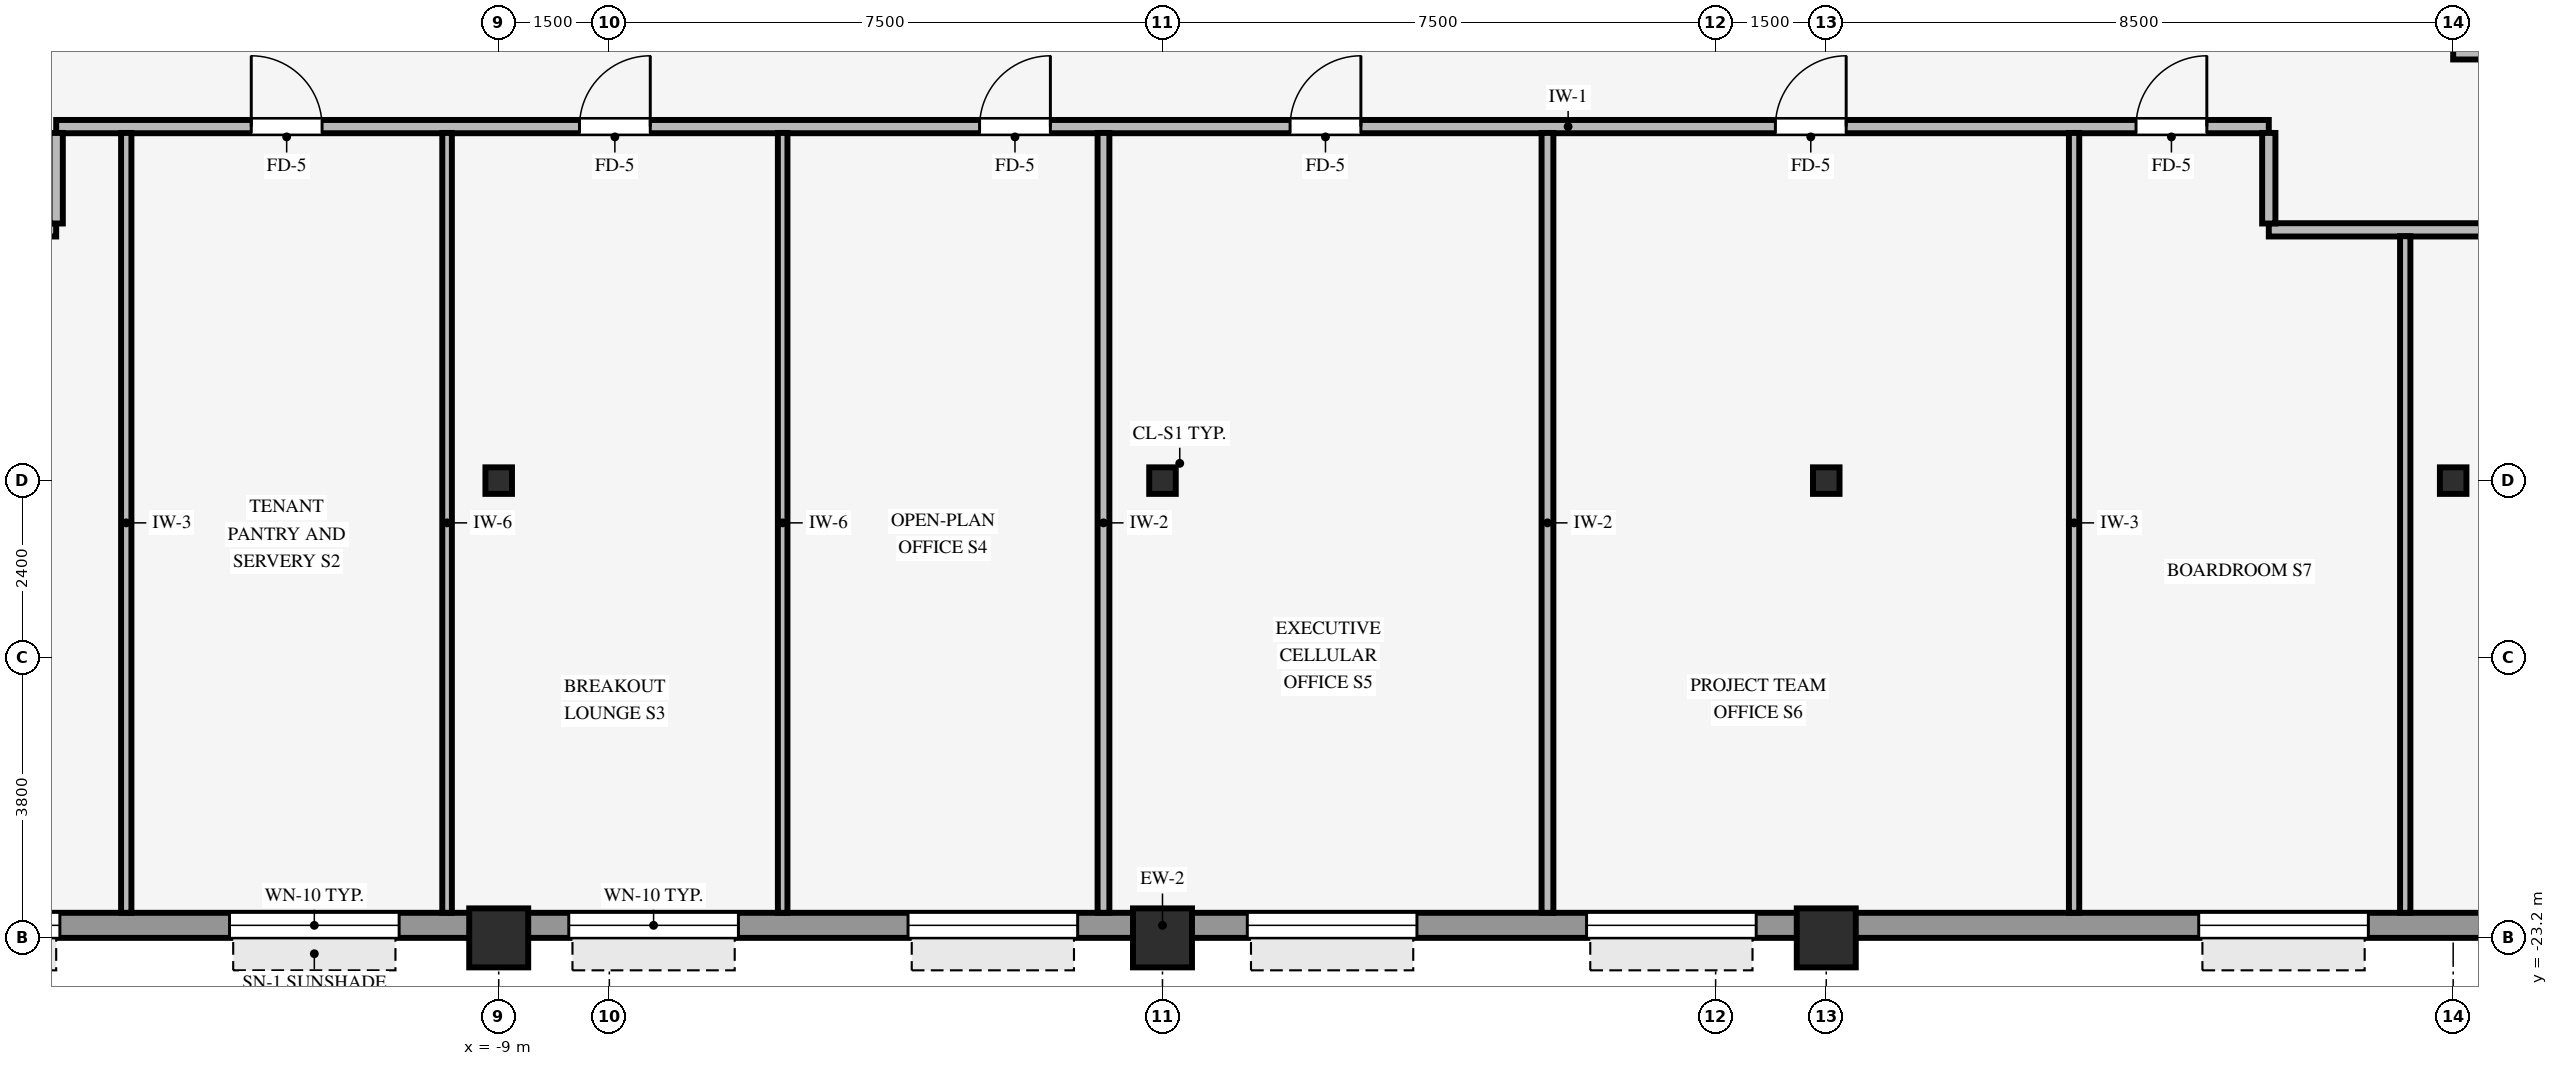
"""IFC4 building model, lengths in metres.
Left out: names, types, materials, properties, quantities, classifications, styles, units other than length and angle.
Written with IfcOpenShell. Run it as: python <this file> out.ifc"""

import sys

from ifc_helpers import new_model, si_unit, direction, frame, frame_2d, origin, origin_2d, place, context, subcontext, project, spatial, rectangle, hollow_rectangle, i_section, extrude, source, transform, mapped, element, fill, save


model = new_model("IFC4")
c1 = context("Model", 3, precision=1e-05, world=origin(), true_north=direction((0.0, 1.0)))
c2 = subcontext(c1, "Body", "Model", "MODEL_VIEW")
j1 = project(units=[si_unit("LENGTHUNIT", "METRE"), si_unit("PLANEANGLEUNIT", "RADIAN")], contexts=[c1])
p1 = place(None, origin())
s1 = spatial("IfcSite", under=j1, at=p1, CompositionType="ELEMENT")
p2 = place(p1, origin())
s2 = spatial("IfcBuilding", under=s1, at=p2, CompositionType="ELEMENT")
p3 = place(p2, frame((0.0, 0.0, 71.4)))
s3 = spatial("IfcBuildingStorey", under=s2, at=p3, CompositionType="ELEMENT", Elevation=71.4)
for number, where, z_axis, x_axis in (
    (1, (-9.0, -23.2, 0.0), (0.0, 0.0, 1.0), (1.0, 0.0, 0.0)),
    (2, (0.0, -23.2, 0.0), (0.0, 0.0, 1.0), (1.0, 0.0, 0.0)),
    (3, (9.0, -23.2, 0.0), (0.0, 0.0, 1.0), (1.0, 0.0, 0.0)),
):
    element("IfcColumn", number, at=place(p3, frame(where, z_axis=z_axis, x_axis=x_axis)), inside=s3, PredefinedType="COLUMN", context=c2, shape_type="SweptSolid", body=[
        extrude(hollow_rectangle(XDim=0.8, YDim=0.8, WallThickness=0.055, InnerFilletRadius=0.055, OuterFilletRadius=0.11, at=origin_2d()), origin(), (0.0, 0.0, 1.0), 3.37),
    ])
for number, where, z_axis, x_axis in (
    (4, (0.0, -17.0, 0.0), (0.0, 0.0, 1.0), (1.0, 0.0, 0.0)),
    (5, (-9.0, -17.0, 0.0), (0.0, 0.0, 1.0), (1.0, 0.0, 0.0)),
    (6, (9.0, -17.0, 0.0), (0.0, 0.0, 1.0), (1.0, 0.0, 0.0)),
    (7, (17.5, -17.0, 0.0), (0.0, 0.0, 1.0), (1.0, 0.0, 0.0)),
):
    element("IfcColumn", number, at=place(p3, frame(where, z_axis=z_axis, x_axis=x_axis)), inside=s3, PredefinedType="COLUMN", context=c2, shape_type="SweptSolid", body=[
        extrude(i_section(OverallWidth=0.36, OverallDepth=0.36, WebThickness=0.021, FlangeThickness=0.021, FilletRadius=0.018, at=origin_2d()), origin(), (0.0, 0.0, 1.0), 3.37),
    ])
p4 = place(p3, frame((-19.4, -23.03, 0.0), z_axis=(0.0, 0.0, 1.0), x_axis=(1.0, 0.0, 0.0)))
e8 = element("IfcWall", 8, at=p4, inside=s3, PredefinedType="STANDARD", context=c2, shape_type="SweptSolid", body=[
    extrude(rectangle(XDim=38.8, YDim=0.34, at=frame_2d((19.4, 0.0))), origin(), (0.0, 0.0, 1.0), 2.705),
])
p5 = place(p4, frame((2.15, 0.0, 0.8)))
e9 = element("IfcOpeningElement", 9, at=p5, cuts=e8, PredefinedType="OPENING", context=c2, shape_type="SweptSolid", body=[
    extrude(rectangle(XDim=2.3, YDim=1.62, at=frame_2d((1.15, 0.81))), frame((0.0, 0.18, 0.0), z_axis=(0.0, -1.0, 0.0), x_axis=(1.0, 0.0, 0.0)), (0.0, 0.0, 1.0), 0.36),
])
p6 = place(p4, frame((6.75, 0.0, 0.8)))
e10 = element("IfcOpeningElement", 10, at=p6, cuts=e8, PredefinedType="OPENING", context=c2, shape_type="SweptSolid", body=[
    extrude(rectangle(XDim=2.3, YDim=1.62, at=frame_2d((1.15, 0.81))), frame((0.0, 0.18, 0.0), z_axis=(0.0, -1.0, 0.0), x_axis=(1.0, 0.0, 0.0)), (0.0, 0.0, 1.0), 0.36),
])
p7 = place(p4, frame((11.35, 0.0, 0.8)))
e11 = element("IfcOpeningElement", 11, at=p7, cuts=e8, PredefinedType="OPENING", context=c2, shape_type="SweptSolid", body=[
    extrude(rectangle(XDim=2.3, YDim=1.62, at=frame_2d((1.15, 0.81))), frame((0.0, 0.18, 0.0), z_axis=(0.0, -1.0, 0.0), x_axis=(1.0, 0.0, 0.0)), (0.0, 0.0, 1.0), 0.36),
])
p8 = place(p4, frame((15.95, 0.0, 0.8)))
e12 = element("IfcOpeningElement", 12, at=p8, cuts=e8, PredefinedType="OPENING", context=c2, shape_type="SweptSolid", body=[
    extrude(rectangle(XDim=2.3, YDim=1.62, at=frame_2d((1.15, 0.81))), frame((0.0, 0.18, 0.0), z_axis=(0.0, -1.0, 0.0), x_axis=(1.0, 0.0, 0.0)), (0.0, 0.0, 1.0), 0.36),
])
p9 = place(p4, frame((20.55, 0.0, 0.8)))
e13 = element("IfcOpeningElement", 13, at=p9, cuts=e8, PredefinedType="OPENING", context=c2, shape_type="SweptSolid", body=[
    extrude(rectangle(XDim=2.3, YDim=1.62, at=frame_2d((1.15, 0.81))), frame((0.0, 0.18, 0.0), z_axis=(0.0, -1.0, 0.0), x_axis=(1.0, 0.0, 0.0)), (0.0, 0.0, 1.0), 0.36),
])
p10 = place(p4, frame((25.15, 0.0, 0.8)))
e14 = element("IfcOpeningElement", 14, at=p10, cuts=e8, PredefinedType="OPENING", context=c2, shape_type="SweptSolid", body=[
    extrude(rectangle(XDim=2.3, YDim=1.62, at=frame_2d((1.15, 0.81))), frame((0.0, 0.18, 0.0), z_axis=(0.0, -1.0, 0.0), x_axis=(1.0, 0.0, 0.0)), (0.0, 0.0, 1.0), 0.36),
])
p11 = place(p4, frame((33.45, 0.0, 0.8)))
e15 = element("IfcOpeningElement", 15, at=p11, cuts=e8, PredefinedType="OPENING", context=c2, shape_type="SweptSolid", body=[
    extrude(rectangle(XDim=2.3, YDim=1.62, at=frame_2d((1.15, 0.81))), frame((0.0, 0.18, 0.0), z_axis=(0.0, -1.0, 0.0), x_axis=(1.0, 0.0, 0.0)), (0.0, 0.0, 1.0), 0.36),
])
p12 = place(p3, frame((-20.5, -13.6, 0.0), z_axis=(0.0, 0.0, 1.0), x_axis=(1.0, 0.0, 0.0)))
e16 = element("IfcWall", 16, at=p12, inside=s3, PredefinedType="PARTITIONING", context=c2, shape_type="SweptSolid", body=[
    extrude(rectangle(XDim=5.5, YDim=0.18, at=frame_2d((2.75, 0.0))), origin(), (0.0, 0.0, 1.0), 2.942),
])
p13 = place(p12, frame((2.27, 0.0, 0.0)))
e17 = element("IfcOpeningElement", 17, at=p13, cuts=e16, PredefinedType="OPENING", context=c2, shape_type="SweptSolid", body=[
    extrude(rectangle(XDim=0.96, YDim=2.1, at=frame_2d((0.48, 1.05))), frame((0.0, 0.1, 0.0), z_axis=(0.0, -1.0, 0.0), x_axis=(1.0, 0.0, 0.0)), (0.0, 0.0, 1.0), 0.2),
])
p14 = place(p3, frame((15.0, -13.6, 0.0), z_axis=(0.0, 0.0, 1.0), x_axis=(1.0, 0.0, 0.0)))
e18 = element("IfcWall", 18, at=p14, inside=s3, PredefinedType="PARTITIONING", context=c2, shape_type="SweptSolid", body=[
    extrude(rectangle(XDim=5.5, YDim=0.18, at=frame_2d((2.75, 0.0))), origin(), (0.0, 0.0, 1.0), 2.942),
])
p15 = place(p14, frame((3.195, 0.0, 0.0)))
e19 = element("IfcOpeningElement", 19, at=p15, cuts=e18, PredefinedType="OPENING", context=c2, shape_type="SweptSolid", body=[
    extrude(rectangle(XDim=0.96, YDim=2.1, at=frame_2d((0.48, 1.05))), frame((0.0, 0.1, 0.0), z_axis=(0.0, -1.0, 0.0), x_axis=(1.0, 0.0, 0.0)), (0.0, 0.0, 1.0), 0.2),
])
p16 = place(p3, frame((-15.0, -12.2, 0.0), z_axis=(0.0, 0.0, 1.0), x_axis=(1.0, 0.0, 0.0)))
e20 = element("IfcWall", 20, at=p16, inside=s3, PredefinedType="PARTITIONING", context=c2, shape_type="SweptSolid", body=[
    extrude(rectangle(XDim=30.0, YDim=0.18, at=frame_2d((15.0, 0.0))), origin(), (0.0, 0.0, 1.0), 3.36),
])
p17 = place(p16, frame((23.31, 0.0, 0.0)))
e21 = element("IfcOpeningElement", 21, at=p17, cuts=e20, PredefinedType="OPENING", context=c2, shape_type="SweptSolid", body=[
    extrude(rectangle(XDim=0.96, YDim=2.1, at=frame_2d((0.48, 1.05))), frame((0.0, 0.1, 0.0), z_axis=(0.0, -1.0, 0.0), x_axis=(1.0, 0.0, 0.0)), (0.0, 0.0, 1.0), 0.2),
])
p18 = place(p16, frame((16.73, 0.0, 0.0)))
e22 = element("IfcOpeningElement", 22, at=p18, cuts=e20, PredefinedType="OPENING", context=c2, shape_type="SweptSolid", body=[
    extrude(rectangle(XDim=0.96, YDim=2.1, at=frame_2d((0.48, 1.05))), frame((0.0, 0.1, 0.0), z_axis=(0.0, -1.0, 0.0), x_axis=(1.0, 0.0, 0.0)), (0.0, 0.0, 1.0), 0.2),
])
p19 = place(p16, frame((7.095, 0.0, 0.0)))
e23 = element("IfcOpeningElement", 23, at=p19, cuts=e20, PredefinedType="OPENING", context=c2, shape_type="SweptSolid", body=[
    extrude(rectangle(XDim=0.96, YDim=2.1, at=frame_2d((0.48, 1.05))), frame((0.0, 0.1, 0.0), z_axis=(0.0, -1.0, 0.0), x_axis=(1.0, 0.0, 0.0)), (0.0, 0.0, 1.0), 0.2),
])
p20 = place(p16, frame((2.645, 0.0, 0.0)))
e24 = element("IfcOpeningElement", 24, at=p20, cuts=e20, PredefinedType="OPENING", context=c2, shape_type="SweptSolid", body=[
    extrude(rectangle(XDim=0.96, YDim=2.1, at=frame_2d((0.48, 1.05))), frame((0.0, 0.1, 0.0), z_axis=(0.0, -1.0, 0.0), x_axis=(1.0, 0.0, 0.0)), (0.0, 0.0, 1.0), 0.2),
])
p21 = place(p16, frame((28.2, 0.0, 0.0)))
e25 = element("IfcOpeningElement", 25, at=p21, cuts=e20, PredefinedType="OPENING", context=c2, shape_type="SweptSolid", body=[
    extrude(rectangle(XDim=0.96, YDim=2.1, at=frame_2d((0.48, 1.05))), frame((0.0, 0.1, 0.0), z_axis=(0.0, -1.0, 0.0), x_axis=(1.0, 0.0, 0.0)), (0.0, 0.0, 1.0), 0.2),
])
p22 = place(p16, frame((12.52, 0.0, 0.0)))
e26 = element("IfcOpeningElement", 26, at=p22, cuts=e20, PredefinedType="OPENING", context=c2, shape_type="SweptSolid", body=[
    extrude(rectangle(XDim=0.96, YDim=2.1, at=frame_2d((0.48, 1.05))), frame((0.0, 0.1, 0.0), z_axis=(0.0, -1.0, 0.0), x_axis=(1.0, 0.0, 0.0)), (0.0, 0.0, 1.0), 0.2),
])
p23 = place(p3, frame((17.5, -11.2, 0.0), z_axis=(0.0, 0.0, 1.0), x_axis=(1.0, 0.0, 0.0)))
e27 = element("IfcWall", 27, at=p23, inside=s3, PredefinedType="PARTITIONING", context=c2, shape_type="SweptSolid", body=[
    extrude(rectangle(XDim=3.66, YDim=0.18, at=frame_2d((1.83, 0.0))), origin(), (0.0, 0.0, 1.0), 3.36),
])
p24 = place(p3, frame((-15.0, -13.514, 0.0), z_axis=(0.0, 0.0, 1.0), x_axis=(0.0, 1.0, 0.0)))
e28 = element("IfcWall", 28, at=p24, inside=s3, PredefinedType="PARTITIONING", context=c2, shape_type="SweptSolid", body=[
    extrude(rectangle(XDim=1.228, YDim=0.18, at=frame_2d((0.614, 0.0))), origin(), (0.0, 0.0, 1.0), 3.36),
])
p25 = place(p3, frame((-14.05, -22.86, 0.0), z_axis=(0.0, 0.0, 1.0), x_axis=(0.0, 1.0, 0.0)))
e29 = element("IfcWall", 29, at=p25, inside=s3, PredefinedType="PARTITIONING", context=c2, shape_type="SweptSolid", body=[
    extrude(rectangle(XDim=10.574, YDim=0.14, at=frame_2d((5.287, 0.0))), origin(), (0.0, 0.0, 1.0), 3.36),
])
for number, where, z_axis, x_axis in (
    (30, (-9.7, -22.86, 0.0), (0.0, 0.0, 1.0), (0.0, 1.0, 0.0)),
    (31, (-5.15, -22.86, 0.0), (0.0, 0.0, 1.0), (0.0, 1.0, 0.0)),
):
    element("IfcWall", number, at=place(p3, frame(where, z_axis=z_axis, x_axis=x_axis)), inside=s3, PredefinedType="PARTITIONING", context=c2, shape_type="SweptSolid", body=[
        extrude(rectangle(XDim=10.574, YDim=0.13, at=frame_2d((5.287, 0.0))), origin(), (0.0, 0.0, 1.0), 3.36),
    ])
for number, where, z_axis, x_axis in (
    (32, (-0.8, -22.86, 0.0), (0.0, 0.0, 1.0), (0.0, 1.0, 0.0)),
    (33, (5.22, -22.86, 0.0), (0.0, 0.0, 1.0), (0.0, 1.0, 0.0)),
):
    element("IfcWall", number, at=place(p3, frame(where, z_axis=z_axis, x_axis=x_axis)), inside=s3, PredefinedType="PARTITIONING", context=c2, shape_type="SweptSolid", body=[
        extrude(rectangle(XDim=10.574, YDim=0.16, at=frame_2d((5.287, 0.0))), origin(), (0.0, 0.0, 1.0), 3.36),
    ])
p26 = place(p3, frame((12.36, -22.86, 0.0), z_axis=(0.0, 0.0, 1.0), x_axis=(0.0, 1.0, 0.0)))
e34 = element("IfcWall", 34, at=p26, inside=s3, PredefinedType="PARTITIONING", context=c2, shape_type="SweptSolid", body=[
    extrude(rectangle(XDim=10.574, YDim=0.14, at=frame_2d((5.287, 0.0))), origin(), (0.0, 0.0, 1.0), 3.36),
])
p27 = place(p3, frame((15.0, -13.514, 0.0), z_axis=(0.0, 0.0, 1.0), x_axis=(0.0, 1.0, 0.0)))
e35 = element("IfcWall", 35, at=p27, inside=s3, PredefinedType="PARTITIONING", context=c2, shape_type="SweptSolid", body=[
    extrude(rectangle(XDim=1.228, YDim=0.18, at=frame_2d((0.614, 0.0))), origin(), (0.0, 0.0, 1.0), 3.36),
])
p28 = place(p3, frame((16.85, -22.86, 0.0), z_axis=(0.0, 0.0, 1.0), x_axis=(0.0, 1.0, 0.0)))
e36 = element("IfcWall", 36, at=p28, inside=s3, PredefinedType="PARTITIONING", context=c2, shape_type="SweptSolid", body=[
    extrude(rectangle(XDim=9.174, YDim=0.14, at=frame_2d((4.587, 0.0))), origin(), (0.0, 0.0, 1.0), 3.36),
])
m1 = source(origin(), c2, "Body", "SweptSolid", [
    extrude(rectangle(XDim=2.3, YDim=1.62, at=frame_2d((1.15, 0.81))), frame((0.0, 0.03, 0.0), z_axis=(0.0, -1.0, 0.0), x_axis=(1.0, 0.0, 0.0)), (0.0, 0.0, 1.0), 0.06),
])
p29 = place(p5, origin())
e37 = element("IfcWindow", 37, at=p29, inside=s3, PartitioningType="SINGLE_PANEL", PredefinedType="WINDOW", context=c2, shape_type="MappedRepresentation", body=[
    mapped(m1, transform((0.0, 0.0, 0.0), scale=1.0)),
])
fill(e9, e37)
p30 = place(p6, origin())
e38 = element("IfcWindow", 38, at=p30, inside=s3, PartitioningType="SINGLE_PANEL", PredefinedType="WINDOW", context=c2, shape_type="MappedRepresentation", body=[
    mapped(m1, transform((0.0, 0.0, 0.0), scale=1.0)),
])
fill(e10, e38)
p31 = place(p7, origin())
e39 = element("IfcWindow", 39, at=p31, inside=s3, PartitioningType="SINGLE_PANEL", PredefinedType="WINDOW", context=c2, shape_type="MappedRepresentation", body=[
    mapped(m1, transform((0.0, 0.0, 0.0), scale=1.0)),
])
fill(e11, e39)
p32 = place(p8, origin())
e40 = element("IfcWindow", 40, at=p32, inside=s3, PartitioningType="SINGLE_PANEL", PredefinedType="WINDOW", context=c2, shape_type="MappedRepresentation", body=[
    mapped(m1, transform((0.0, 0.0, 0.0), scale=1.0)),
])
fill(e12, e40)
p33 = place(p9, origin())
e41 = element("IfcWindow", 41, at=p33, inside=s3, PartitioningType="SINGLE_PANEL", PredefinedType="WINDOW", context=c2, shape_type="MappedRepresentation", body=[
    mapped(m1, transform((0.0, 0.0, 0.0), scale=1.0)),
])
fill(e13, e41)
p34 = place(p10, origin())
e42 = element("IfcWindow", 42, at=p34, inside=s3, PartitioningType="SINGLE_PANEL", PredefinedType="WINDOW", context=c2, shape_type="MappedRepresentation", body=[
    mapped(m1, transform((0.0, 0.0, 0.0), scale=1.0)),
])
fill(e14, e42)
p35 = place(p11, origin())
e43 = element("IfcWindow", 43, at=p35, inside=s3, PartitioningType="SINGLE_PANEL", PredefinedType="WINDOW", context=c2, shape_type="MappedRepresentation", body=[
    mapped(m1, transform((0.0, 0.0, 0.0), scale=1.0)),
])
fill(e15, e43)
m2 = source(origin(), c2, "Body", "SweptSolid", [
    extrude(rectangle(XDim=0.96, YDim=2.1, at=frame_2d((0.48, 1.05))), frame((0.0, 0.025, 0.0), z_axis=(0.0, -1.0, 0.0), x_axis=(1.0, 0.0, 0.0)), (0.0, 0.0, 1.0), 0.05),
])
p36 = place(p17, origin())
e44 = element("IfcDoor", 44, at=p36, inside=s3, OperationType="SINGLE_SWING_RIGHT", PredefinedType="DOOR", context=c2, shape_type="MappedRepresentation", body=[
    mapped(m2, transform((0.0, 0.0, 0.0), scale=1.0)),
])
fill(e21, e44)
p37 = place(p18, origin())
e45 = element("IfcDoor", 45, at=p37, inside=s3, OperationType="SINGLE_SWING_RIGHT", PredefinedType="DOOR", context=c2, shape_type="MappedRepresentation", body=[
    mapped(m2, transform((0.0, 0.0, 0.0), scale=1.0)),
])
fill(e22, e45)
p38 = place(p19, origin())
e46 = element("IfcDoor", 46, at=p38, inside=s3, OperationType="SINGLE_SWING_RIGHT", PredefinedType="DOOR", context=c2, shape_type="MappedRepresentation", body=[
    mapped(m2, transform((0.0, 0.0, 0.0), scale=1.0)),
])
fill(e23, e46)
p39 = place(p20, origin())
e47 = element("IfcDoor", 47, at=p39, inside=s3, OperationType="SINGLE_SWING_LEFT", PredefinedType="DOOR", context=c2, shape_type="MappedRepresentation", body=[
    mapped(m2, transform((0.0, 0.0, 0.0), scale=1.0)),
])
fill(e24, e47)
p40 = place(p21, origin())
e48 = element("IfcDoor", 48, at=p40, inside=s3, OperationType="SINGLE_SWING_RIGHT", PredefinedType="DOOR", context=c2, shape_type="MappedRepresentation", body=[
    mapped(m2, transform((0.0, 0.0, 0.0), scale=1.0)),
])
fill(e25, e48)
p41 = place(p22, origin())
e49 = element("IfcDoor", 49, at=p41, inside=s3, OperationType="SINGLE_SWING_RIGHT", PredefinedType="DOOR", context=c2, shape_type="MappedRepresentation", body=[
    mapped(m2, transform((0.0, 0.0, 0.0), scale=1.0)),
])
fill(e26, e49)
save(model, sys.argv[1])
